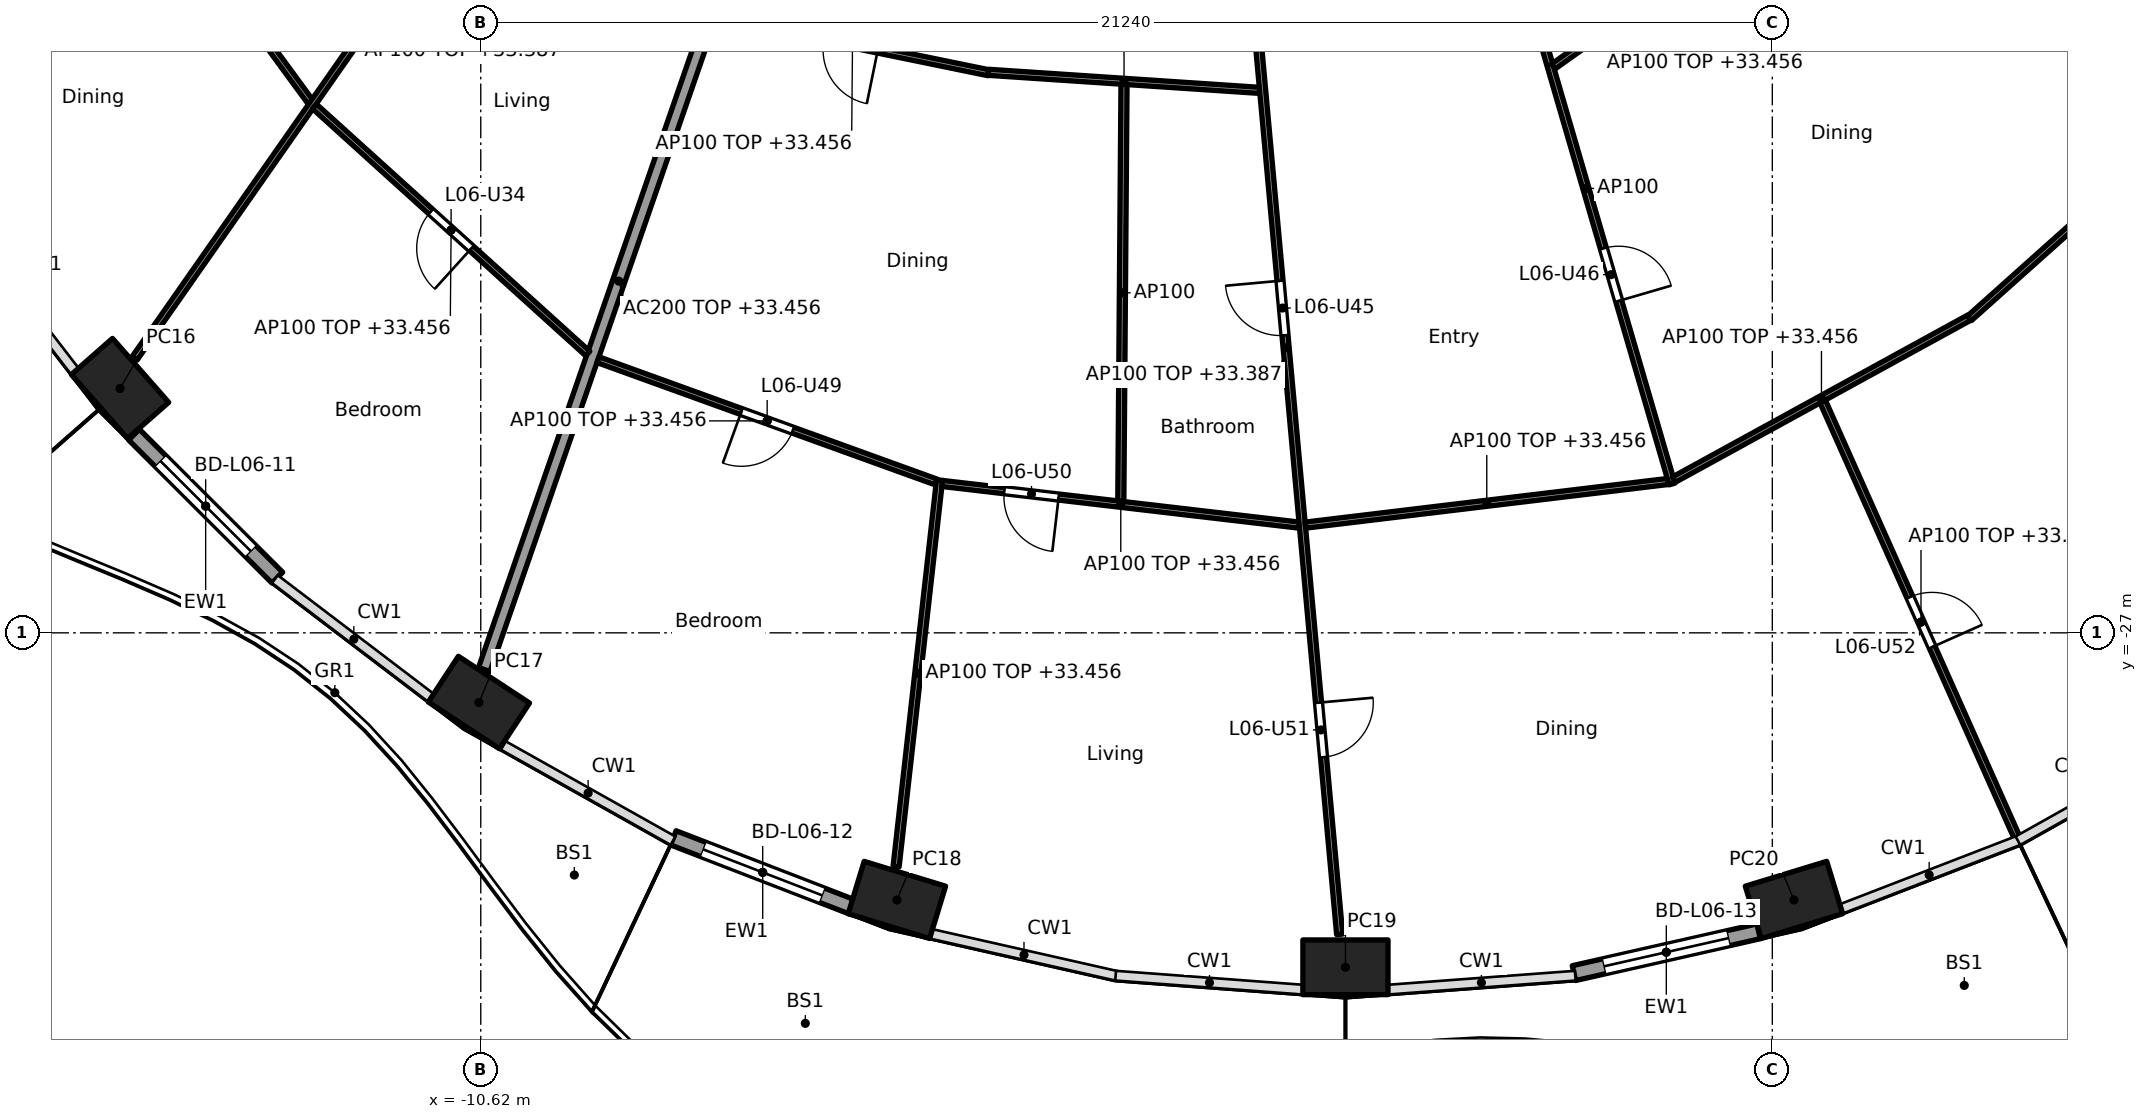
"""IFC4 building model, lengths in metres.
Left out: names, types, materials, properties, quantities, classifications, styles, units other than length and angle.
Written with IfcOpenShell. Run it as: python <this file> out.ifc"""

import sys

from ifc_helpers import new_model, si_unit, direction, frame, frame_2d, origin, origin_2d, place, context, subcontext, project, spatial, rectangle, hollow_rectangle, extrude, element, fill, save


model = new_model("IFC4")
c1 = context("Model", 3, precision=1e-05, world=origin(), true_north=direction((0.0, 1.0)))
c2 = subcontext(c1, "Body", "Model", "MODEL_VIEW")
j1 = project(units=[si_unit("LENGTHUNIT", "METRE"), si_unit("PLANEANGLEUNIT", "RADIAN")], contexts=[c1])
p1 = place(None, origin())
s1 = spatial("IfcSite", under=j1, at=p1, CompositionType="ELEMENT")
p2 = place(p1, origin())
s2 = spatial("IfcBuilding", under=s1, at=p2, CompositionType="ELEMENT")
p3 = place(p2, frame((0.0, 0.0, 30.7)))
s3 = spatial("IfcBuildingStorey", under=s2, at=p3, CompositionType="ELEMENT", Elevation=30.7)
for number, where, z_axis, x_axis in (
    (1, (-16.552, -22.981, 0.0), (0.0, 0.0, 1.0), (0.66, -0.751, 0.0)),
    (2, (-10.65, -28.146, 0.0), (0.0, 0.0, 1.0), (0.836, -0.549, 0.0)),
    (3, (-3.776, -31.393, 0.0), (0.0, 0.0, 1.0), (0.957, -0.292, 0.0)),
    (4, (3.6, -32.5, 0.0), (0.0, 0.0, 1.0), (1.0, 0.0, 0.0)),
    (5, (10.976, -31.393, 0.0), (0.0, 0.0, 1.0), (0.957, 0.292, 0.0)),
):
    element("IfcColumn", number, at=place(p3, frame(where, z_axis=z_axis, x_axis=x_axis)), inside=s3, PredefinedType="COLUMN", context=c2, shape_type="SweptSolid", body=[
        extrude(hollow_rectangle(XDim=1.4, YDim=0.9, WallThickness=0.05, at=origin_2d()), origin(), (0.0, 0.0, 1.0), 3.7),
    ])
p4 = place(p3, frame((-13.966, -26.092, 0.0), z_axis=(0.0, 0.0, 1.0), x_axis=(-0.707803094595, 0.706409781417, 0.0)))
e6 = element("IfcWall", 6, at=p4, inside=s3, PredefinedType="SOLIDWALL", context=c2, shape_type="SweptSolid", body=[
    extrude(rectangle(XDim=3.329, YDim=0.25, at=frame_2d((1.665, 0.0))), origin(), (0.0, 0.0, 1.0), 3.44),
])
p5 = place(p4, frame((0.615, 0.0, 0.0)))
e7 = element("IfcOpeningElement", 7, at=p5, cuts=e6, PredefinedType="OPENING", context=c2, shape_type="SweptSolid", body=[
    extrude(rectangle(XDim=2.1, YDim=2.4, at=frame_2d((1.05, 1.2))), frame((0.0, 0.135, 0.0), z_axis=(0.0, -1.0, 0.0), x_axis=(1.0, 0.0, 0.0)), (0.0, 0.0, 1.0), 0.27),
])
p6 = place(p3, frame((-4.514, -31.507, 0.0), z_axis=(0.0, 0.0, 1.0), x_axis=(-0.932809381943, 0.360370166577, 0.0)))
e8 = element("IfcWall", 8, at=p6, inside=s3, PredefinedType="SOLIDWALL", context=c2, shape_type="SweptSolid", body=[
    extrude(rectangle(XDim=3.151, YDim=0.25, at=frame_2d((1.575, 0.0))), origin(), (0.0, 0.0, 1.0), 3.44),
])
p7 = place(p6, frame((0.525, 0.0, 0.0)))
e9 = element("IfcOpeningElement", 9, at=p7, cuts=e8, PredefinedType="OPENING", context=c2, shape_type="SweptSolid", body=[
    extrude(rectangle(XDim=2.1, YDim=2.4, at=frame_2d((1.05, 1.2))), frame((0.0, 0.135, 0.0), z_axis=(0.0, -1.0, 0.0), x_axis=(1.0, 0.0, 0.0)), (0.0, 0.0, 1.0), 0.27),
])
p8 = place(p3, frame((10.396, -31.908, 0.0), z_axis=(0.0, 0.0, 1.0), x_axis=(-0.97533495413, -0.220729987208, 0.0)))
e10 = element("IfcWall", 10, at=p8, inside=s3, PredefinedType="SOLIDWALL", context=c2, shape_type="SweptSolid", body=[
    extrude(rectangle(XDim=3.115, YDim=0.25, at=frame_2d((1.557, 0.0))), origin(), (0.0, 0.0, 1.0), 3.44),
])
p9 = place(p8, frame((0.507, 0.0, 0.0)))
e11 = element("IfcOpeningElement", 11, at=p9, cuts=e10, PredefinedType="OPENING", context=c2, shape_type="SweptSolid", body=[
    extrude(rectangle(XDim=2.1, YDim=2.4, at=frame_2d((1.05, 1.2))), frame((0.0, 0.135, 0.0), z_axis=(0.0, -1.0, 0.0), x_axis=(1.0, 0.0, 0.0)), (0.0, 0.0, 1.0), 0.27),
])
p10 = place(p3, frame((-6.139, -14.829, 0.0), z_axis=(0.0, 0.0, 1.0), x_axis=(-0.327178799566, -0.944962450637, 0.0)))
e12 = element("IfcWall", 12, at=p10, inside=s3, PredefinedType="PARTITIONING", context=c2, shape_type="SweptSolid", body=[
    extrude(rectangle(XDim=13.517, YDim=0.2, at=frame_2d((6.759, 0.0))), origin(), (0.0, 0.0, 1.0), 2.756),
])
p11 = place(p3, frame((-17.152, -13.18, 0.0), z_axis=(0.0, 0.0, 1.0), x_axis=(0.591222750954, -0.806508312886, 0.0)))
e13 = element("IfcWall", 13, at=p11, inside=s3, PredefinedType="PARTITIONING", context=c2, shape_type="SweptSolid", body=[
    extrude(rectangle(XDim=6.31, YDim=0.1, at=frame_2d((3.155, 0.0))), origin(), (0.0, 0.0, 1.0), 2.756),
])
p12 = place(p11, frame((2.705, 0.0, 0.0)))
e14 = element("IfcOpeningElement", 14, at=p12, cuts=e13, PredefinedType="OPENING", context=c2, shape_type="SweptSolid", body=[
    extrude(rectangle(XDim=0.9, YDim=2.1, at=frame_2d((0.45, 1.05))), frame((0.0, 0.06, 0.0), z_axis=(0.0, -1.0, 0.0), x_axis=(1.0, 0.0, 0.0)), (0.0, 0.0, 1.0), 0.12),
])
p13 = place(p3, frame((-7.715, -10.193, 0.0), z_axis=(0.0, 0.0, 1.0), x_axis=(-0.573126964124, -0.819466584428, 0.0)))
e15 = element("IfcWall", 15, at=p13, inside=s3, PredefinedType="PARTITIONING", context=c2, shape_type="SweptSolid", body=[
    extrude(rectangle(XDim=15.001, YDim=0.1, at=frame_2d((7.5, 0.0))), origin(), (0.0, 0.0, 1.0), 2.687),
])
p14 = place(p13, frame((1.678, 0.0, 0.0)))
e16 = element("IfcOpeningElement", 16, at=p14, cuts=e15, PredefinedType="OPENING", context=c2, shape_type="SweptSolid", body=[
    extrude(rectangle(XDim=0.9, YDim=2.1, at=frame_2d((0.45, 1.05))), frame((0.0, 0.06, 0.0), z_axis=(0.0, -1.0, 0.0), x_axis=(1.0, 0.0, 0.0)), (0.0, 0.0, 1.0), 0.12),
])
p15 = place(p13, frame((6.631, 0.0, 0.0)))
e17 = element("IfcOpeningElement", 17, at=p15, cuts=e15, PredefinedType="OPENING", context=c2, shape_type="SweptSolid", body=[
    extrude(rectangle(XDim=0.9, YDim=2.1, at=frame_2d((0.45, 1.05))), frame((0.0, 0.06, 0.0), z_axis=(0.0, -1.0, 0.0), x_axis=(1.0, 0.0, 0.0)), (0.0, 0.0, 1.0), 0.12),
])
p16 = place(p3, frame((-13.355, -18.343, 0.0), z_axis=(0.0, 0.0, 1.0), x_axis=(0.741713303551, -0.670717060567, 0.0)))
e18 = element("IfcWall", 18, at=p16, inside=s3, PredefinedType="PARTITIONING", context=c2, shape_type="SweptSolid", body=[
    extrude(rectangle(XDim=6.059, YDim=0.1, at=frame_2d((3.03, 0.0))), origin(), (0.0, 0.0, 1.0), 2.756),
])
p17 = place(p16, frame((2.58, 0.0, 0.0)))
e19 = element("IfcOpeningElement", 19, at=p17, cuts=e18, PredefinedType="OPENING", context=c2, shape_type="SweptSolid", body=[
    extrude(rectangle(XDim=0.9, YDim=2.1, at=frame_2d((0.45, 1.05))), frame((0.0, 0.06, 0.0), z_axis=(0.0, -1.0, 0.0), x_axis=(1.0, 0.0, 0.0)), (0.0, 0.0, 1.0), 0.12),
])
p18 = place(p3, frame((-6.741, -16.872, 0.0), z_axis=(0.0, 0.0, 1.0), x_axis=(0.979595137747, -0.200981009307, 0.0)))
e20 = element("IfcWall", 20, at=p18, inside=s3, PredefinedType="PARTITIONING", context=c2, shape_type="SweptSolid", body=[
    extrude(rectangle(XDim=4.562, YDim=0.1, at=frame_2d((2.281, 0.0))), origin(), (0.0, 0.0, 1.0), 2.756),
])
p19 = place(p18, frame((1.806, 0.0, 0.0)))
e21 = element("IfcOpeningElement", 21, at=p19, cuts=e20, PredefinedType="OPENING", context=c2, shape_type="SweptSolid", body=[
    extrude(rectangle(XDim=0.9, YDim=2.1, at=frame_2d((0.45, 1.05))), frame((0.0, 0.06, 0.0), z_axis=(0.0, -1.0, 0.0), x_axis=(1.0, 0.0, 0.0)), (0.0, 0.0, 1.0), 0.12),
])
p20 = place(p3, frame((-8.692, -22.508, 0.0), z_axis=(0.0, 0.0, 1.0), x_axis=(0.940401494588, -0.340066212636, 0.0)))
e22 = element("IfcWall", 22, at=p20, inside=s3, PredefinedType="PARTITIONING", context=c2, shape_type="SweptSolid", body=[
    extrude(rectangle(XDim=5.917, YDim=0.1, at=frame_2d((2.958, 0.0))), origin(), (0.0, 0.0, 1.0), 2.756),
])
p21 = place(p20, frame((2.509, 0.0, 0.0)))
e23 = element("IfcOpeningElement", 23, at=p21, cuts=e22, PredefinedType="OPENING", context=c2, shape_type="SweptSolid", body=[
    extrude(rectangle(XDim=0.9, YDim=2.1, at=frame_2d((0.45, 1.05))), frame((0.0, 0.06, 0.0), z_axis=(0.0, -1.0, 0.0), x_axis=(1.0, 0.0, 0.0)), (0.0, 0.0, 1.0), 0.12),
])
p22 = place(p3, frame((-2.271, -17.782, 0.0), z_axis=(0.0, 0.0, 1.0), x_axis=(0.997791437766, -0.066424744789, 0.0)))
e24 = element("IfcWall", 24, at=p22, inside=s3, PredefinedType="PARTITIONING", context=c2, shape_type="SweptSolid", body=[
    extrude(rectangle(XDim=4.469, YDim=0.1, at=frame_2d((2.235, 0.0))), origin(), (0.0, 0.0, 1.0), 2.756),
])
p23 = place(p3, frame((-3.075, -24.488, 0.0), z_axis=(0.0, 0.0, 1.0), x_axis=(-0.111705235978, -0.993741384997, 0.0)))
e25 = element("IfcWall", 25, at=p23, inside=s3, PredefinedType="PARTITIONING", context=c2, shape_type="SweptSolid", body=[
    extrude(rectangle(XDim=6.395, YDim=0.1, at=frame_2d((3.198, 0.0))), origin(), (0.0, 0.0, 1.0), 2.756),
])
p24 = place(p3, frame((-3.031, -24.543, 0.0), z_axis=(0.0, 0.0, 1.0), x_axis=(0.993255612046, -0.115945198862, 0.0)))
e26 = element("IfcWall", 26, at=p24, inside=s3, PredefinedType="PARTITIONING", context=c2, shape_type="SweptSolid", body=[
    extrude(rectangle(XDim=5.913, YDim=0.1, at=frame_2d((2.956, 0.0))), origin(), (0.0, 0.0, 1.0), 2.756),
])
p25 = place(p24, frame((1.028, 0.0, 0.0)))
e27 = element("IfcOpeningElement", 27, at=p25, cuts=e26, PredefinedType="OPENING", context=c2, shape_type="SweptSolid", body=[
    extrude(rectangle(XDim=0.9, YDim=2.1, at=frame_2d((0.45, 1.05))), frame((0.0, 0.06, 0.0), z_axis=(0.0, -1.0, 0.0), x_axis=(1.0, 0.0, 0.0)), (0.0, 0.0, 1.0), 0.12),
])
p26 = place(p3, frame((-0.042, -17.98, 0.0), z_axis=(0.0, 0.0, 1.0), x_axis=(-0.007692080119, -0.999970415514, 0.0)))
e28 = element("IfcWall", 28, at=p26, inside=s3, PredefinedType="PARTITIONING", context=c2, shape_type="SweptSolid", body=[
    extrude(rectangle(XDim=6.856, YDim=0.1, at=frame_2d((3.428, 0.0))), origin(), (0.0, 0.0, 1.0), 3.44),
])
p27 = place(p3, frame((1.744, -12.664, 0.0), z_axis=(0.0, 0.0, 1.0), x_axis=(0.090893639596, -0.995860605849, 0.0)))
e29 = element("IfcWall", 29, at=p27, inside=s3, PredefinedType="PARTITIONING", context=c2, shape_type="SweptSolid", body=[
    extrude(rectangle(XDim=19.374, YDim=0.1, at=frame_2d((9.687, 0.0))), origin(), (0.0, 0.0, 1.0), 2.687),
])
p28 = place(p27, frame((2.27, 0.0, 0.0)))
e30 = element("IfcOpeningElement", 30, at=p28, cuts=e29, PredefinedType="OPENING", context=c2, shape_type="SweptSolid", body=[
    extrude(rectangle(XDim=0.9, YDim=2.1, at=frame_2d((0.45, 1.05))), frame((0.0, 0.06, 0.0), z_axis=(0.0, -1.0, 0.0), x_axis=(1.0, 0.0, 0.0)), (0.0, 0.0, 1.0), 0.12),
])
p29 = place(p27, frame((8.582, 0.0, 0.0)))
e31 = element("IfcOpeningElement", 31, at=p29, cuts=e29, PredefinedType="OPENING", context=c2, shape_type="SweptSolid", body=[
    extrude(rectangle(XDim=0.9, YDim=2.1, at=frame_2d((0.45, 1.05))), frame((0.0, 0.06, 0.0), z_axis=(0.0, -1.0, 0.0), x_axis=(1.0, 0.0, 0.0)), (0.0, 0.0, 1.0), 0.12),
])
p30 = place(p27, frame((15.548, 0.0, 0.0)))
e32 = element("IfcOpeningElement", 32, at=p30, cuts=e29, PredefinedType="OPENING", context=c2, shape_type="SweptSolid", body=[
    extrude(rectangle(XDim=0.9, YDim=2.1, at=frame_2d((0.45, 1.05))), frame((0.0, 0.06, 0.0), z_axis=(0.0, -1.0, 0.0), x_axis=(1.0, 0.0, 0.0)), (0.0, 0.0, 1.0), 0.12),
])
p31 = place(p3, frame((2.941, -25.229, 0.0), z_axis=(0.0, 0.0, 1.0), x_axis=(0.992836798252, 0.119478416615, 0.0)))
e33 = element("IfcWall", 33, at=p31, inside=s3, PredefinedType="PARTITIONING", context=c2, shape_type="SweptSolid", body=[
    extrude(rectangle(XDim=6.01, YDim=0.1, at=frame_2d((3.005, 0.0))), origin(), (0.0, 0.0, 1.0), 2.756),
])
p32 = place(p3, frame((6.137, -14.83, 0.0), z_axis=(0.0, 0.0, 1.0), x_axis=(0.279843546189, -0.960045618529, 0.0)))
e34 = element("IfcWall", 34, at=p32, inside=s3, PredefinedType="PARTITIONING", context=c2, shape_type="SweptSolid", body=[
    extrude(rectangle(XDim=10.127, YDim=0.1, at=frame_2d((5.063, 0.0))), origin(), (0.0, 0.0, 1.0), 3.44),
])
p33 = place(p32, frame((1.334, 0.0, 0.0)))
e35 = element("IfcOpeningElement", 35, at=p33, cuts=e34, PredefinedType="OPENING", context=c2, shape_type="SweptSolid", body=[
    extrude(rectangle(XDim=0.9, YDim=2.1, at=frame_2d((0.45, 1.05))), frame((0.0, 0.06, 0.0), z_axis=(0.0, -1.0, 0.0), x_axis=(1.0, 0.0, 0.0)), (0.0, 0.0, 1.0), 0.12),
])
p34 = place(p32, frame((6.091, 0.0, 0.0)))
e36 = element("IfcOpeningElement", 36, at=p34, cuts=e34, PredefinedType="OPENING", context=c2, shape_type="SweptSolid", body=[
    extrude(rectangle(XDim=0.9, YDim=2.1, at=frame_2d((0.45, 1.05))), frame((0.0, 0.06, 0.0), z_axis=(0.0, -1.0, 0.0), x_axis=(1.0, 0.0, 0.0)), (0.0, 0.0, 1.0), 0.12),
])
p35 = place(p3, frame((7.019, -17.686, 0.0), z_axis=(0.0, 0.0, 1.0), x_axis=(0.81494477814, 0.57953861699, 0.0)))
e37 = element("IfcWall", 37, at=p35, inside=s3, PredefinedType="PARTITIONING", context=c2, shape_type="SweptSolid", body=[
    extrude(rectangle(XDim=3.644, YDim=0.1, at=frame_2d((1.822, 0.0))), origin(), (0.0, 0.0, 1.0), 2.756),
])
p36 = place(p3, frame((9.001, -24.48, 0.0), z_axis=(0.0, 0.0, 1.0), x_axis=(0.876794415294, 0.480865421203, 0.0)))
e38 = element("IfcWall", 38, at=p36, inside=s3, PredefinedType="PARTITIONING", context=c2, shape_type="SweptSolid", body=[
    extrude(rectangle(XDim=5.536, YDim=0.1, at=frame_2d((2.768, 0.0))), origin(), (0.0, 0.0, 1.0), 2.756),
])
p37 = place(p3, frame((11.448, -23.195, 0.0), z_axis=(0.0, 0.0, 1.0), x_axis=(0.407016520798, -0.913420796675, 0.0)))
e39 = element("IfcWall", 39, at=p37, inside=s3, PredefinedType="PARTITIONING", context=c2, shape_type="SweptSolid", body=[
    extrude(rectangle(XDim=7.944, YDim=0.1, at=frame_2d((3.972, 0.0))), origin(), (0.0, 0.0, 1.0), 2.837),
])
p38 = place(p37, frame((3.522, 0.0, 0.0)))
e40 = element("IfcOpeningElement", 40, at=p38, cuts=e39, PredefinedType="OPENING", context=c2, shape_type="SweptSolid", body=[
    extrude(rectangle(XDim=0.9, YDim=2.1, at=frame_2d((0.45, 1.05))), frame((0.0, 0.06, 0.0), z_axis=(0.0, -1.0, 0.0), x_axis=(1.0, 0.0, 0.0)), (0.0, 0.0, 1.0), 0.12),
])
p39 = place(p3, frame((13.862, -21.828, 0.0), z_axis=(0.0, 0.0, 1.0), x_axis=(0.745812746724, 0.666155647596, 0.0)))
e41 = element("IfcWall", 41, at=p39, inside=s3, PredefinedType="PARTITIONING", context=c2, shape_type="SweptSolid", body=[
    extrude(rectangle(XDim=5.931, YDim=0.1, at=frame_2d((2.965, 0.0))), origin(), (0.0, 0.0, 1.0), 2.756),
])
p40 = place(p39, frame((4.023, 0.0, 0.0)))
e42 = element("IfcOpeningElement", 42, at=p40, cuts=e41, PredefinedType="OPENING", context=c2, shape_type="SweptSolid", body=[
    extrude(rectangle(XDim=0.9, YDim=2.1, at=frame_2d((0.45, 1.05))), frame((0.0, 0.06, 0.0), z_axis=(0.0, -1.0, 0.0), x_axis=(1.0, 0.0, 0.0)), (0.0, 0.0, 1.0), 0.12),
])
p41 = place(p3, frame((8.957, -8.953, 0.0), z_axis=(0.0, 0.0, 1.0), x_axis=(0.725250022034, -0.688485588476, 0.0)))
e43 = element("IfcWall", 43, at=p41, inside=s3, PredefinedType="PARTITIONING", context=c2, shape_type="SweptSolid", body=[
    extrude(rectangle(XDim=12.963, YDim=0.1, at=frame_2d((6.481, 0.0))), origin(), (0.0, 0.0, 1.0), 2.687),
])
p42 = place(p41, frame((2.333, 0.0, 0.0)))
e44 = element("IfcOpeningElement", 44, at=p42, cuts=e43, PredefinedType="OPENING", context=c2, shape_type="SweptSolid", body=[
    extrude(rectangle(XDim=0.9, YDim=2.1, at=frame_2d((0.45, 1.05))), frame((0.0, 0.06, 0.0), z_axis=(0.0, -1.0, 0.0), x_axis=(1.0, 0.0, 0.0)), (0.0, 0.0, 1.0), 0.12),
])
p43 = place(p41, frame((8.79, 0.0, 0.0)))
e45 = element("IfcOpeningElement", 45, at=p43, cuts=e43, PredefinedType="OPENING", context=c2, shape_type="SweptSolid", body=[
    extrude(rectangle(XDim=0.9, YDim=2.1, at=frame_2d((0.45, 1.05))), frame((0.0, 0.06, 0.0), z_axis=(0.0, -1.0, 0.0), x_axis=(1.0, 0.0, 0.0)), (0.0, 0.0, 1.0), 0.12),
])
p44 = place(p5, origin())
e46 = element("IfcDoor", 46, at=p44, inside=s3, OperationType="SLIDING_TO_LEFT", PredefinedType="DOOR", context=c2, shape_type="SweptSolid", body=[
    extrude(rectangle(XDim=2.1, YDim=2.4, at=frame_2d((1.05, 1.2))), frame((0.0, 0.025, 0.0), z_axis=(0.0, -1.0, 0.0), x_axis=(1.0, 0.0, 0.0)), (0.0, 0.0, 1.0), 0.05),
])
fill(e7, e46)
p45 = place(p7, origin())
e47 = element("IfcDoor", 47, at=p45, inside=s3, OperationType="SLIDING_TO_LEFT", PredefinedType="DOOR", context=c2, shape_type="SweptSolid", body=[
    extrude(rectangle(XDim=2.1, YDim=2.4, at=frame_2d((1.05, 1.2))), frame((0.0, 0.025, 0.0), z_axis=(0.0, -1.0, 0.0), x_axis=(1.0, 0.0, 0.0)), (0.0, 0.0, 1.0), 0.05),
])
fill(e9, e47)
p46 = place(p9, origin())
e48 = element("IfcDoor", 48, at=p46, inside=s3, OperationType="SLIDING_TO_LEFT", PredefinedType="DOOR", context=c2, shape_type="SweptSolid", body=[
    extrude(rectangle(XDim=2.1, YDim=2.4, at=frame_2d((1.05, 1.2))), frame((0.0, 0.025, 0.0), z_axis=(0.0, -1.0, 0.0), x_axis=(1.0, 0.0, 0.0)), (0.0, 0.0, 1.0), 0.05),
])
fill(e11, e48)
p47 = place(p17, frame((0.9, 0.0, 0.0), x_axis=(-1.0, 0.0, 0.0)))
e49 = element("IfcDoor", 49, at=p47, inside=s3, OperationType="SINGLE_SWING_LEFT", PredefinedType="DOOR", context=c2, shape_type="SweptSolid", body=[
    extrude(rectangle(XDim=0.9, YDim=2.1, at=frame_2d((0.45, 1.05))), frame((0.0, 0.025, 0.0), z_axis=(0.0, -1.0, 0.0), x_axis=(1.0, 0.0, 0.0)), (0.0, 0.0, 1.0), 0.05),
])
fill(e19, e49)
p48 = place(p29, frame((0.9, 0.0, 0.0), x_axis=(-1.0, 0.0, 0.0)))
e50 = element("IfcDoor", 50, at=p48, inside=s3, OperationType="SINGLE_SWING_RIGHT", PredefinedType="DOOR", context=c2, shape_type="SweptSolid", body=[
    extrude(rectangle(XDim=0.9, YDim=2.1, at=frame_2d((0.45, 1.05))), frame((0.0, 0.025, 0.0), z_axis=(0.0, -1.0, 0.0), x_axis=(1.0, 0.0, 0.0)), (0.0, 0.0, 1.0), 0.05),
])
fill(e31, e50)
p49 = place(p34, origin())
e51 = element("IfcDoor", 51, at=p49, inside=s3, OperationType="SINGLE_SWING_RIGHT", PredefinedType="DOOR", context=c2, shape_type="SweptSolid", body=[
    extrude(rectangle(XDim=0.9, YDim=2.1, at=frame_2d((0.45, 1.05))), frame((0.0, 0.025, 0.0), z_axis=(0.0, -1.0, 0.0), x_axis=(1.0, 0.0, 0.0)), (0.0, 0.0, 1.0), 0.05),
])
fill(e36, e51)
p50 = place(p21, frame((0.9, 0.0, 0.0), x_axis=(-1.0, 0.0, 0.0)))
e52 = element("IfcDoor", 52, at=p50, inside=s3, OperationType="SINGLE_SWING_RIGHT", PredefinedType="DOOR", context=c2, shape_type="SweptSolid", body=[
    extrude(rectangle(XDim=0.9, YDim=2.1, at=frame_2d((0.45, 1.05))), frame((0.0, 0.025, 0.0), z_axis=(0.0, -1.0, 0.0), x_axis=(1.0, 0.0, 0.0)), (0.0, 0.0, 1.0), 0.05),
])
fill(e23, e52)
p51 = place(p25, frame((0.9, 0.0, 0.0), x_axis=(-1.0, 0.0, 0.0)))
e53 = element("IfcDoor", 53, at=p51, inside=s3, OperationType="SINGLE_SWING_LEFT", PredefinedType="DOOR", context=c2, shape_type="SweptSolid", body=[
    extrude(rectangle(XDim=0.9, YDim=2.1, at=frame_2d((0.45, 1.05))), frame((0.0, 0.025, 0.0), z_axis=(0.0, -1.0, 0.0), x_axis=(1.0, 0.0, 0.0)), (0.0, 0.0, 1.0), 0.05),
])
fill(e27, e53)
p52 = place(p30, origin())
e54 = element("IfcDoor", 54, at=p52, inside=s3, OperationType="SINGLE_SWING_LEFT", PredefinedType="DOOR", context=c2, shape_type="SweptSolid", body=[
    extrude(rectangle(XDim=0.9, YDim=2.1, at=frame_2d((0.45, 1.05))), frame((0.0, 0.025, 0.0), z_axis=(0.0, -1.0, 0.0), x_axis=(1.0, 0.0, 0.0)), (0.0, 0.0, 1.0), 0.05),
])
fill(e32, e54)
p53 = place(p38, origin())
e55 = element("IfcDoor", 55, at=p53, inside=s3, OperationType="SINGLE_SWING_RIGHT", PredefinedType="DOOR", context=c2, shape_type="SweptSolid", body=[
    extrude(rectangle(XDim=0.9, YDim=2.1, at=frame_2d((0.45, 1.05))), frame((0.0, 0.025, 0.0), z_axis=(0.0, -1.0, 0.0), x_axis=(1.0, 0.0, 0.0)), (0.0, 0.0, 1.0), 0.05),
])
fill(e40, e55)
save(model, sys.argv[1])
